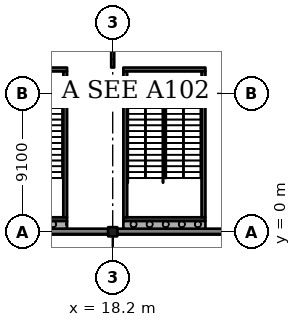
"""IFC4 building model, lengths in metres.
Left out: names, types, materials, properties, quantities, classifications, styles, units other than length and angle.
Written with IfcOpenShell. Run it as: python <this file> out.ifc"""

import sys

from ifc_helpers import new_model, si_unit, direction, frame, frame_2d, origin, origin_2d, place, context, subcontext, project, spatial, rectangle, extrude, element, fill, save


model = new_model("IFC4")
c1 = context("Model", 3, precision=1e-05, world=origin(), true_north=direction((0.0, 1.0)))
c2 = subcontext(c1, "Body", "Model", "MODEL_VIEW")
j1 = project(units=[si_unit("LENGTHUNIT", "METRE"), si_unit("PLANEANGLEUNIT", "RADIAN")], contexts=[c1])
p1 = place(None, origin())
s1 = spatial("IfcSite", under=j1, at=p1, CompositionType="ELEMENT")
p2 = place(p1, origin())
s2 = spatial("IfcBuilding", under=s1, at=p2, CompositionType="ELEMENT")
p3 = place(p2, origin())
s3 = spatial("IfcBuildingStorey", under=s2, at=p3, CompositionType="ELEMENT", Elevation=0.0)
p4 = place(p3, frame((18.2, 0.0, -0.4), z_axis=(0.0, 0.0, 1.0), x_axis=(1.0, 0.0, 0.0)))
e1 = element("IfcColumn", 1, at=p4, inside=s3, PredefinedType="COLUMN", context=c2, shape_type="SweptSolid", body=[
    extrude(rectangle(XDim=0.6, YDim=0.6, at=origin_2d()), origin(), (0.0, 0.0, 1.0), 6.77),
])
p5 = place(p3, frame((18.2, 9.1, -0.4), z_axis=(0.0, 0.0, 1.0), x_axis=(1.0, 0.0, 0.0)))
e2 = element("IfcColumn", 2, at=p5, inside=s3, PredefinedType="COLUMN", context=c2, shape_type="SweptSolid", body=[
    extrude(rectangle(XDim=0.8, YDim=0.8, at=origin_2d()), origin(), (0.0, 0.0, 1.0), 6.77),
])
p6 = place(p3, frame((15.2, 0.825, -0.4), z_axis=(0.0, 0.0, 1.0), x_axis=(-1.0, 0.0, 0.0)))
e3 = element("IfcWall", 3, at=p6, inside=s3, PredefinedType="SHEAR", context=c2, shape_type="SweptSolid", body=[
    extrude(rectangle(XDim=5.4, YDim=0.25, at=frame_2d((2.7, 0.0))), origin(), (0.0, 0.0, 1.0), 6.77),
])
p7 = place(p3, frame((15.2, 10.675, -0.4), z_axis=(0.0, 0.0, 1.0), x_axis=(-1.0, 0.0, 0.0)))
e4 = element("IfcWall", 4, at=p7, inside=s3, PredefinedType="SHEAR", context=c2, shape_type="SweptSolid", body=[
    extrude(rectangle(XDim=5.4, YDim=0.25, at=frame_2d((2.7, 0.0))), origin(), (0.0, 0.0, 1.0), 6.77),
])
p8 = place(p7, frame((1.5, 0.0, 0.4)))
e5 = element("IfcOpeningElement", 5, at=p8, cuts=e4, PredefinedType="OPENING", context=c2, shape_type="SweptSolid", body=[
    extrude(rectangle(XDim=2.4, YDim=2.1, at=frame_2d((1.2, 1.05))), frame((0.0, 0.135, 0.0), z_axis=(0.0, -1.0, 0.0), x_axis=(1.0, 0.0, 0.0)), (0.0, 0.0, 1.0), 0.27),
])
p9 = place(p3, frame((15.075, 10.55, -0.4), z_axis=(0.0, 0.0, 1.0), x_axis=(0.0, -1.0, 0.0)))
e6 = element("IfcWall", 6, at=p9, inside=s3, PredefinedType="SHEAR", context=c2, shape_type="SweptSolid", body=[
    extrude(rectangle(XDim=9.6, YDim=0.25, at=frame_2d((4.8, 0.0))), origin(), (0.0, 0.0, 1.0), 6.77),
])
p10 = place(p9, frame((0.45, 0.0, 0.4)))
e7 = element("IfcOpeningElement", 7, at=p10, cuts=e6, PredefinedType="OPENING", context=c2, shape_type="SweptSolid", body=[
    extrude(rectangle(XDim=1.2, YDim=2.1, at=frame_2d((0.6, 1.05))), frame((0.0, 0.135, 0.0), z_axis=(0.0, -1.0, 0.0), x_axis=(1.0, 0.0, 0.0)), (0.0, 0.0, 1.0), 0.27),
])
p11 = place(p3, frame((24.3, 0.825, -0.4), z_axis=(0.0, 0.0, 1.0), x_axis=(-1.0, 0.0, 0.0)))
e8 = element("IfcWall", 8, at=p11, inside=s3, PredefinedType="SHEAR", context=c2, shape_type="SweptSolid", body=[
    extrude(rectangle(XDim=5.4, YDim=0.25, at=frame_2d((2.7, 0.0))), origin(), (0.0, 0.0, 1.0), 6.77),
])
p12 = place(p3, frame((24.3, 10.675, -0.4), z_axis=(0.0, 0.0, 1.0), x_axis=(-1.0, 0.0, 0.0)))
e9 = element("IfcWall", 9, at=p12, inside=s3, PredefinedType="SHEAR", context=c2, shape_type="SweptSolid", body=[
    extrude(rectangle(XDim=5.4, YDim=0.25, at=frame_2d((2.7, 0.0))), origin(), (0.0, 0.0, 1.0), 6.77),
])
p13 = place(p12, frame((1.5, 0.0, 0.4)))
e10 = element("IfcOpeningElement", 10, at=p13, cuts=e9, PredefinedType="OPENING", context=c2, shape_type="SweptSolid", body=[
    extrude(rectangle(XDim=2.4, YDim=2.1, at=frame_2d((1.2, 1.05))), frame((0.0, 0.135, 0.0), z_axis=(0.0, -1.0, 0.0), x_axis=(1.0, 0.0, 0.0)), (0.0, 0.0, 1.0), 0.27),
])
p14 = place(p3, frame((19.025, 10.55, -0.4), z_axis=(0.0, 0.0, 1.0), x_axis=(0.0, -1.0, 0.0)))
e11 = element("IfcWall", 11, at=p14, inside=s3, PredefinedType="SHEAR", context=c2, shape_type="SweptSolid", body=[
    extrude(rectangle(XDim=9.6, YDim=0.25, at=frame_2d((4.8, 0.0))), origin(), (0.0, 0.0, 1.0), 6.77),
])
p15 = place(p3, frame((24.175, 10.55, -0.4), z_axis=(0.0, 0.0, 1.0), x_axis=(0.0, -1.0, 0.0)))
e12 = element("IfcWall", 12, at=p15, inside=s3, PredefinedType="SHEAR", context=c2, shape_type="SweptSolid", body=[
    extrude(rectangle(XDim=9.6, YDim=0.25, at=frame_2d((4.8, 0.0))), origin(), (0.0, 0.0, 1.0), 6.77),
])
p16 = place(p15, frame((0.45, 0.0, 0.4)))
e13 = element("IfcOpeningElement", 13, at=p16, cuts=e12, PredefinedType="OPENING", context=c2, shape_type="SweptSolid", body=[
    extrude(rectangle(XDim=1.2, YDim=2.1, at=frame_2d((0.6, 1.05))), frame((0.0, 0.135, 0.0), z_axis=(0.0, -1.0, 0.0), x_axis=(1.0, 0.0, 0.0)), (0.0, 0.0, 1.0), 0.27),
])
p17 = place(p3, frame((9.4, 0.025, 0.0), z_axis=(0.0, 0.0, 1.0), x_axis=(1.0, 0.0, 0.0)))
e14 = element("IfcWall", 14, at=p17, inside=s3, PredefinedType="SOLIDWALL", context=c2, shape_type="SweptSolid", body=[
    extrude(rectangle(XDim=8.5, YDim=0.35, at=frame_2d((4.25, 0.0))), origin(), (0.0, 0.0, 1.0), 5.27),
])
p18 = place(p17, frame((5.95, 0.0, 0.0)))
e15 = element("IfcOpeningElement", 15, at=p18, cuts=e14, PredefinedType="OPENING", context=c2, shape_type="SweptSolid", body=[
    extrude(rectangle(XDim=2.1, YDim=2.4, at=frame_2d((1.05, 1.2))), frame((0.0, 0.185, 0.0), z_axis=(0.0, -1.0, 0.0), x_axis=(1.0, 0.0, 0.0)), (0.0, 0.0, 1.0), 0.37),
])
p19 = place(p3, frame((18.5, 0.025, 0.0), z_axis=(0.0, 0.0, 1.0), x_axis=(1.0, 0.0, 0.0)))
e16 = element("IfcWall", 16, at=p19, inside=s3, PredefinedType="SOLIDWALL", context=c2, shape_type="SweptSolid", body=[
    extrude(rectangle(XDim=8.45, YDim=0.35, at=frame_2d((4.225, 0.0))), origin(), (0.0, 0.0, 1.0), 5.27),
])
p20 = place(p19, frame((5.95, 0.0, 0.0)))
e17 = element("IfcOpeningElement", 17, at=p20, cuts=e16, PredefinedType="OPENING", context=c2, shape_type="SweptSolid", body=[
    extrude(rectangle(XDim=2.1, YDim=2.4, at=frame_2d((1.05, 1.2))), frame((0.0, 0.185, 0.0), z_axis=(0.0, -1.0, 0.0), x_axis=(1.0, 0.0, 0.0)), (0.0, 0.0, 1.0), 0.37),
])
p21 = place(p3, frame((9.8, 0.45, 0.0), z_axis=(0.0, 0.0, 1.0), x_axis=(1.0, 0.0, 0.0)))
e18 = element("IfcWall", 18, at=p21, inside=s3, PredefinedType="SOLIDWALL", context=c2, shape_type="SweptSolid", body=[
    extrude(rectangle(XDim=5.4, YDim=0.5, at=frame_2d((2.7, 0.0))), origin(), (0.0, 0.0, 1.0), 6.37),
])
p22 = place(p3, frame((18.9, 0.45, 0.0), z_axis=(0.0, 0.0, 1.0), x_axis=(1.0, 0.0, 0.0)))
e19 = element("IfcWall", 19, at=p22, inside=s3, PredefinedType="SOLIDWALL", context=c2, shape_type="SweptSolid", body=[
    extrude(rectangle(XDim=5.4, YDim=0.5, at=frame_2d((2.7, 0.0))), origin(), (0.0, 0.0, 1.0), 6.37),
])
p23 = place(p3, frame((18.2, 17.725, 0.0), z_axis=(0.0, 0.0, 1.0), x_axis=(0.0, -1.0, 0.0)))
e20 = element("IfcWall", 20, at=p23, inside=s3, PredefinedType="PARTITIONING", context=c2, shape_type="SweptSolid", body=[
    extrude(rectangle(XDim=6.925, YDim=0.2, at=frame_2d((3.462, 0.0))), origin(), (0.0, 0.0, 1.0), 5.32),
])
p24 = place(p23, frame((0.85, 0.0, 0.0)))
e21 = element("IfcOpeningElement", 21, at=p24, cuts=e20, PredefinedType="OPENING", context=c2, shape_type="SweptSolid", body=[
    extrude(rectangle(XDim=1.8, YDim=2.4, at=frame_2d((0.9, 1.2))), frame((0.0, 0.11, 0.0), z_axis=(0.0, -1.0, 0.0), x_axis=(1.0, 0.0, 0.0)), (0.0, 0.0, 1.0), 0.22),
])
p25 = place(p23, frame((4.25, 0.0, 0.0)))
e22 = element("IfcOpeningElement", 22, at=p25, cuts=e20, PredefinedType="OPENING", context=c2, shape_type="SweptSolid", body=[
    extrude(rectangle(XDim=1.8, YDim=2.4, at=frame_2d((0.9, 1.2))), frame((0.0, 0.11, 0.0), z_axis=(0.0, -1.0, 0.0), x_axis=(1.0, 0.0, 0.0)), (0.0, 0.0, 1.0), 0.22),
])
p26 = place(p18, frame((2.1, 0.0, 0.0), z_axis=(0.0, 0.0, 1.0), x_axis=(-1.0, 0.0, 0.0)))
e23 = element("IfcDoor", 23, at=p26, inside=s3, OperationType="DOUBLE_DOOR_SINGLE_SWING", PredefinedType="DOOR", context=c2, shape_type="SweptSolid", body=[
    extrude(rectangle(XDim=2.1, YDim=2.4, at=frame_2d((1.05, 1.2))), frame((0.0, 0.025, 0.0), z_axis=(0.0, -1.0, 0.0), x_axis=(1.0, 0.0, 0.0)), (0.0, 0.0, 1.0), 0.05),
])
fill(e15, e23)
p27 = place(p20, frame((2.1, 0.0, 0.0), z_axis=(0.0, 0.0, 1.0), x_axis=(-1.0, 0.0, 0.0)))
e24 = element("IfcDoor", 24, at=p27, inside=s3, OperationType="DOUBLE_DOOR_SINGLE_SWING", PredefinedType="DOOR", context=c2, shape_type="SweptSolid", body=[
    extrude(rectangle(XDim=2.1, YDim=2.4, at=frame_2d((1.05, 1.2))), frame((0.0, 0.025, 0.0), z_axis=(0.0, -1.0, 0.0), x_axis=(1.0, 0.0, 0.0)), (0.0, 0.0, 1.0), 0.05),
])
fill(e17, e24)
p28 = place(p25, origin())
e25 = element("IfcDoor", 25, at=p28, inside=s3, OperationType="DOUBLE_DOOR_SINGLE_SWING", PredefinedType="DOOR", context=c2, shape_type="SweptSolid", body=[
    extrude(rectangle(XDim=1.8, YDim=2.4, at=frame_2d((0.9, 1.2))), frame((0.0, 0.025, 0.0), z_axis=(0.0, -1.0, 0.0), x_axis=(1.0, 0.0, 0.0)), (0.0, 0.0, 1.0), 0.05),
])
fill(e22, e25)
p29 = place(p13, origin())
e26 = element("IfcDoor", 26, at=p29, inside=s3, OperationType="DOUBLE_DOOR_SINGLE_SWING", PredefinedType="DOOR", context=c2, shape_type="SweptSolid", body=[
    extrude(rectangle(XDim=2.4, YDim=2.1, at=frame_2d((1.2, 1.05))), frame((0.0, 0.025, 0.0), z_axis=(0.0, -1.0, 0.0), x_axis=(1.0, 0.0, 0.0)), (0.0, 0.0, 1.0), 0.05),
])
fill(e10, e26)
p30 = place(p10, origin())
e27 = element("IfcDoor", 27, at=p30, inside=s3, OperationType="SINGLE_SWING_RIGHT", PredefinedType="DOOR", context=c2, shape_type="SweptSolid", body=[
    extrude(rectangle(XDim=1.2, YDim=2.1, at=frame_2d((0.6, 1.05))), frame((0.0, 0.025, 0.0), z_axis=(0.0, -1.0, 0.0), x_axis=(1.0, 0.0, 0.0)), (0.0, 0.0, 1.0), 0.05),
])
fill(e7, e27)
p31 = place(p16, origin())
e28 = element("IfcDoor", 28, at=p31, inside=s3, OperationType="SINGLE_SWING_RIGHT", PredefinedType="DOOR", context=c2, shape_type="SweptSolid", body=[
    extrude(rectangle(XDim=1.2, YDim=2.1, at=frame_2d((0.6, 1.05))), frame((0.0, 0.025, 0.0), z_axis=(0.0, -1.0, 0.0), x_axis=(1.0, 0.0, 0.0)), (0.0, 0.0, 1.0), 0.05),
])
fill(e13, e28)
save(model, sys.argv[1])
